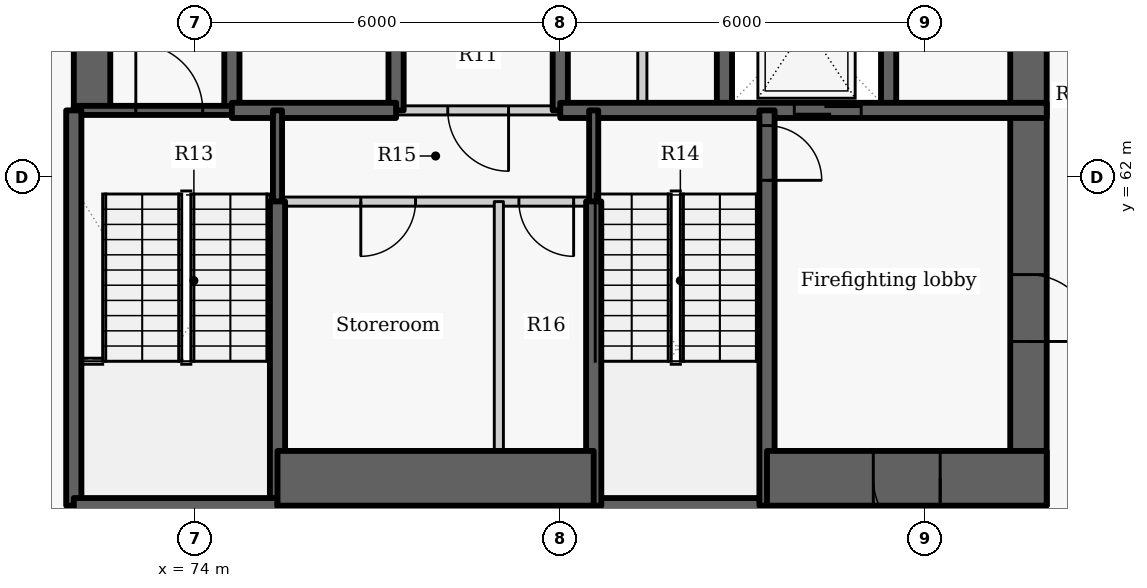
"""IFC4 building model, lengths in metres.
Left out: names, types, materials, properties, quantities, classifications, styles, units other than length and angle.
Written with IfcOpenShell. Run it as: python <this file> out.ifc"""

import sys

from ifc_helpers import new_model, si_unit, direction, frame, frame_2d, origin, place, context, subcontext, project, spatial, rectangle, extrude, element, fill, save


model = new_model("IFC4")
c1 = context("Model", 3, precision=1e-05, world=origin(), true_north=direction((0.0, 1.0)))
c2 = subcontext(c1, "Body", "Model", "MODEL_VIEW")
j1 = project(units=[si_unit("LENGTHUNIT", "METRE"), si_unit("PLANEANGLEUNIT", "RADIAN")], contexts=[c1])
p1 = place(None, origin())
s1 = spatial("IfcSite", under=j1, at=p1, CompositionType="ELEMENT")
p2 = place(p1, origin())
s2 = spatial("IfcBuilding", under=s1, at=p2, CompositionType="ELEMENT")
p3 = place(p2, frame((0.0, 0.0, 19.8)))
s3 = spatial("IfcBuildingStorey", under=s2, at=p3, CompositionType="ELEMENT", Elevation=19.8)
p4 = place(p3, frame((74.6, 63.1, -0.3), z_axis=(0.0, 0.0, 1.0), x_axis=(0.0, 1.0, 0.0)))
e1 = element("IfcWall", 1, at=p4, inside=s3, PredefinedType="SHEAR", context=c2, shape_type="SweptSolid", body=[
    extrude(rectangle(XDim=2.8, YDim=0.25, at=frame_2d((1.4, 0.0))), origin(), (0.0, 0.0, 1.0), 4.2),
])
p5 = place(p3, frame((72.3, 63.1, -0.3), z_axis=(0.0, 0.0, 1.0), x_axis=(0.0, 1.0, 0.0)))
e2 = element("IfcWall", 2, at=p5, inside=s3, PredefinedType="SHEAR", context=c2, shape_type="SweptSolid", body=[
    extrude(rectangle(XDim=9.1, YDim=0.6, at=frame_2d((4.55, 0.0))), origin(), (0.0, 0.0, 1.0), 4.2),
])
for number, where, z_axis, x_axis in (
    (3, (77.3, 63.1, -0.3), (0.0, 0.0, 1.0), (0.0, 1.0, 0.0)),
    (4, (80.0, 63.1, -0.3), (0.0, 0.0, 1.0), (0.0, 1.0, 0.0)),
    (5, (82.7, 63.1, -0.3), (0.0, 0.0, 1.0), (0.0, 1.0, 0.0)),
    (6, (85.4, 63.1, -0.3), (0.0, 0.0, 1.0), (0.0, 1.0, 0.0)),
):
    element("IfcWall", number, at=place(p3, frame(where, z_axis=z_axis, x_axis=x_axis)), inside=s3, PredefinedType="SHEAR", context=c2, shape_type="SweptSolid", body=[
        extrude(rectangle(XDim=2.8, YDim=0.25, at=frame_2d((1.4, 0.0))), origin(), (0.0, 0.0, 1.0), 4.2),
    ])
p6 = place(p3, frame((87.7, 72.2, -0.3), z_axis=(0.0, 0.0, 1.0), x_axis=(0.0, -1.0, 0.0)))
e7 = element("IfcWall", 7, at=p6, inside=s3, PredefinedType="SHEAR", context=c2, shape_type="SweptSolid", body=[
    extrude(rectangle(XDim=15.6, YDim=0.6, at=frame_2d((7.8, 0.0))), origin(), (0.0, 0.0, 1.0), 4.2),
])
p7 = place(p6, frame((11.8, 0.0, 0.3)))
e8 = element("IfcOpeningElement", 8, at=p7, cuts=e7, PredefinedType="OPENING", context=c2, shape_type="SweptSolid", body=[
    extrude(rectangle(XDim=1.1, YDim=2.1, at=frame_2d((0.55, 1.05))), frame((0.0, 0.31, 0.0), z_axis=(0.0, -1.0, 0.0), x_axis=(1.0, 0.0, 0.0)), (0.0, 0.0, 1.0), 0.62),
])
p8 = place(p3, frame((72.0, 63.1, -0.3), z_axis=(0.0, 0.0, 1.0), x_axis=(1.0, 0.0, 0.0)))
e9 = element("IfcWall", 9, at=p8, inside=s3, PredefinedType="SHEAR", context=c2, shape_type="SweptSolid", body=[
    extrude(rectangle(XDim=2.6, YDim=0.15, at=frame_2d((1.3, 0.0))), origin(), (0.0, 0.0, 1.0), 4.2),
])
p9 = place(p8, frame((1.02, 0.0, 0.3)))
e10 = element("IfcOpeningElement", 10, at=p9, cuts=e9, PredefinedType="OPENING", context=c2, shape_type="SweptSolid", body=[
    extrude(rectangle(XDim=1.1, YDim=2.1, at=frame_2d((0.55, 1.05))), frame((0.0, 0.085, 0.0), z_axis=(0.0, -1.0, 0.0), x_axis=(1.0, 0.0, 0.0)), (0.0, 0.0, 1.0), 0.17),
])
p10 = place(p3, frame((74.6, 63.1, -0.3), z_axis=(0.0, 0.0, 1.0), x_axis=(1.0, 0.0, 0.0)))
e11 = element("IfcWall", 11, at=p10, inside=s3, PredefinedType="SHEAR", context=c2, shape_type="SweptSolid", body=[
    extrude(rectangle(XDim=2.7, YDim=0.25, at=frame_2d((1.35, 0.0))), origin(), (0.0, 0.0, 1.0), 4.2),
])
p11 = place(p3, frame((80.0, 63.1, -0.3), z_axis=(0.0, 0.0, 1.0), x_axis=(1.0, 0.0, 0.0)))
e12 = element("IfcWall", 12, at=p11, inside=s3, PredefinedType="SHEAR", context=c2, shape_type="SweptSolid", body=[
    extrude(rectangle(XDim=8.0, YDim=0.25, at=frame_2d((4.0, 0.0))), origin(), (0.0, 0.0, 1.0), 4.2),
])
p12 = place(p11, frame((3.849, 0.0, 0.3)))
e13 = element("IfcOpeningElement", 13, at=p12, cuts=e12, PredefinedType="OPENING", context=c2, shape_type="SweptSolid", body=[
    extrude(rectangle(XDim=1.1, YDim=2.1, at=frame_2d((0.55, 1.05))), frame((0.0, 0.135, 0.0), z_axis=(0.0, -1.0, 0.0), x_axis=(1.0, 0.0, 0.0)), (0.0, 0.0, 1.0), 0.27),
])
p13 = place(p3, frame((80.0, 63.1, 0.0), z_axis=(0.0, 0.0, 1.0), x_axis=(-1.0, 0.0, 0.0)))
e14 = element("IfcWall", 14, at=p13, inside=s3, PredefinedType="PARTITIONING", context=c2, shape_type="SweptSolid", body=[
    extrude(rectangle(XDim=2.7, YDim=0.15, at=frame_2d((1.35, 0.0))), origin(), (0.0, 0.0, 1.0), 3.9),
])
p14 = place(p13, frame((0.85, 0.0, 0.0)))
e15 = element("IfcOpeningElement", 15, at=p14, cuts=e14, PredefinedType="OPENING", context=c2, shape_type="SweptSolid", body=[
    extrude(rectangle(XDim=1.0, YDim=2.1, at=frame_2d((0.5, 1.05))), frame((0.0, 0.085, 0.0), z_axis=(0.0, -1.0, 0.0), x_axis=(1.0, 0.0, 0.0)), (0.0, 0.0, 1.0), 0.17),
])
p15 = place(p3, frame((81.35, 63.1, 0.0), z_axis=(0.0, 0.0, 1.0), x_axis=(0.0, 1.0, 0.0)))
e16 = element("IfcWall", 16, at=p15, inside=s3, PredefinedType="PARTITIONING", context=c2, shape_type="SweptSolid", body=[
    extrude(rectangle(XDim=2.8, YDim=0.15, at=frame_2d((1.4, 0.0))), origin(), (0.0, 0.0, 1.0), 3.9),
])
p16 = place(p3, frame((75.35, 61.597, -0.3), z_axis=(0.0, 0.0, 1.0), x_axis=(0.0, 1.0, 0.0)))
e17 = element("IfcWall", 17, at=p16, inside=s3, PredefinedType="SHEAR", context=c2, shape_type="SweptSolid", body=[
    extrude(rectangle(XDim=1.503, YDim=0.15, at=frame_2d((0.751, 0.0))), origin(), (0.0, 0.0, 1.0), 4.2),
])
p17 = place(p3, frame((75.35, 56.6, -0.3), z_axis=(0.0, 0.0, 1.0), x_axis=(0.0, 1.0, 0.0)))
e18 = element("IfcWall", 18, at=p17, inside=s3, PredefinedType="SHEAR", context=c2, shape_type="SweptSolid", body=[
    extrude(rectangle(XDim=5.003, YDim=0.25, at=frame_2d((2.501, 0.0))), origin(), (0.0, 0.0, 1.0), 4.2),
])
p18 = place(p3, frame((72.0, 56.6, -0.3), z_axis=(0.0, 0.0, 1.0), x_axis=(0.0, 1.0, 0.0)))
e19 = element("IfcWall", 19, at=p18, inside=s3, PredefinedType="SHEAR", context=c2, shape_type="SweptSolid", body=[
    extrude(rectangle(XDim=6.5, YDim=0.25, at=frame_2d((3.25, 0.0))), origin(), (0.0, 0.0, 1.0), 4.2),
])
p19 = place(p3, frame((72.0, 56.6, -0.3), z_axis=(0.0, 0.0, 1.0), x_axis=(1.0, 0.0, 0.0)))
e20 = element("IfcWall", 20, at=p19, inside=s3, PredefinedType="SHEAR", context=c2, shape_type="SweptSolid", body=[
    extrude(rectangle(XDim=3.35, YDim=0.25, at=frame_2d((1.675, 0.0))), origin(), (0.0, 0.0, 1.0), 4.2),
])
p20 = place(p3, frame((80.55, 56.6, -0.3), z_axis=(0.0, 0.0, 1.0), x_axis=(1.0, 0.0, 0.0)))
e21 = element("IfcWall", 21, at=p20, inside=s3, PredefinedType="SHEAR", context=c2, shape_type="SweptSolid", body=[
    extrude(rectangle(XDim=2.85, YDim=0.25, at=frame_2d((1.425, 0.0))), origin(), (0.0, 0.0, 1.0), 4.2),
])
p21 = place(p3, frame((83.4, 63.1, -0.3), z_axis=(0.0, 0.0, 1.0), x_axis=(0.0, -1.0, 0.0)))
e22 = element("IfcWall", 22, at=p21, inside=s3, PredefinedType="SHEAR", context=c2, shape_type="SweptSolid", body=[
    extrude(rectangle(XDim=6.5, YDim=0.25, at=frame_2d((3.25, 0.0))), origin(), (0.0, 0.0, 1.0), 4.2),
])
p22 = place(p21, frame((0.25, 0.0, 0.3)))
e23 = element("IfcOpeningElement", 23, at=p22, cuts=e22, PredefinedType="OPENING", context=c2, shape_type="SweptSolid", body=[
    extrude(rectangle(XDim=0.9, YDim=2.1, at=frame_2d((0.45, 1.05))), frame((0.0, 0.135, 0.0), z_axis=(0.0, -1.0, 0.0), x_axis=(1.0, 0.0, 0.0)), (0.0, 0.0, 1.0), 0.27),
])
p23 = place(p3, frame((80.55, 61.597, -0.3), z_axis=(0.0, 0.0, 1.0), x_axis=(0.0, 1.0, 0.0)))
e24 = element("IfcWall", 24, at=p23, inside=s3, PredefinedType="SHEAR", context=c2, shape_type="SweptSolid", body=[
    extrude(rectangle(XDim=1.503, YDim=0.15, at=frame_2d((0.751, 0.0))), origin(), (0.0, 0.0, 1.0), 4.2),
])
p24 = place(p3, frame((80.55, 56.6, -0.3), z_axis=(0.0, 0.0, 1.0), x_axis=(0.0, 1.0, 0.0)))
e25 = element("IfcWall", 25, at=p24, inside=s3, PredefinedType="SHEAR", context=c2, shape_type="SweptSolid", body=[
    extrude(rectangle(XDim=5.003, YDim=0.25, at=frame_2d((2.501, 0.0))), origin(), (0.0, 0.0, 1.0), 4.2),
])
p25 = place(p3, frame((75.35, 57.05, -0.3), z_axis=(0.0, 0.0, 1.0), x_axis=(1.0, 0.0, 0.0)))
e26 = element("IfcWall", 26, at=p25, inside=s3, PredefinedType="SHEAR", context=c2, shape_type="SweptSolid", body=[
    extrude(rectangle(XDim=5.2, YDim=0.9, at=frame_2d((2.6, 0.0))), origin(), (0.0, 0.0, 1.0), 4.2),
])
p26 = place(p3, frame((88.0, 57.05, -0.3), z_axis=(0.0, 0.0, 1.0), x_axis=(-1.0, 0.0, 0.0)))
e27 = element("IfcWall", 27, at=p26, inside=s3, PredefinedType="SHEAR", context=c2, shape_type="SweptSolid", body=[
    extrude(rectangle(XDim=4.6, YDim=0.9, at=frame_2d((2.3, 0.0))), origin(), (0.0, 0.0, 1.0), 4.2),
])
p27 = place(p26, frame((1.752, 0.0, 0.3)))
e28 = element("IfcOpeningElement", 28, at=p27, cuts=e27, PredefinedType="OPENING", context=c2, shape_type="SweptSolid", body=[
    extrude(rectangle(XDim=1.1, YDim=2.1, at=frame_2d((0.55, 1.05))), frame((0.0, 0.46, 0.0), z_axis=(0.0, -1.0, 0.0), x_axis=(1.0, 0.0, 0.0)), (0.0, 0.0, 1.0), 0.92),
])
p28 = place(p3, frame((80.55, 61.6, 0.0), z_axis=(0.0, 0.0, 1.0), x_axis=(-1.0, 0.0, 0.0)))
e29 = element("IfcWall", 29, at=p28, inside=s3, PredefinedType="PARTITIONING", context=c2, shape_type="SweptSolid", body=[
    extrude(rectangle(XDim=5.2, YDim=0.15, at=frame_2d((2.6, 0.0))), origin(), (0.0, 0.0, 1.0), 3.9),
])
p29 = place(p28, frame((2.93, 0.0, 0.0)))
e30 = element("IfcOpeningElement", 30, at=p29, cuts=e29, PredefinedType="OPENING", context=c2, shape_type="SweptSolid", body=[
    extrude(rectangle(XDim=0.9, YDim=2.1, at=frame_2d((0.45, 1.05))), frame((0.0, 0.085, 0.0), z_axis=(0.0, -1.0, 0.0), x_axis=(1.0, 0.0, 0.0)), (0.0, 0.0, 1.0), 0.17),
])
p30 = place(p28, frame((0.33, 0.0, 0.0)))
e31 = element("IfcOpeningElement", 31, at=p30, cuts=e29, PredefinedType="OPENING", context=c2, shape_type="SweptSolid", body=[
    extrude(rectangle(XDim=0.9, YDim=2.1, at=frame_2d((0.45, 1.05))), frame((0.0, 0.085, 0.0), z_axis=(0.0, -1.0, 0.0), x_axis=(1.0, 0.0, 0.0)), (0.0, 0.0, 1.0), 0.17),
])
p31 = place(p3, frame((78.99, 56.6, 0.0), z_axis=(0.0, 0.0, 1.0), x_axis=(0.0, 1.0, 0.0)))
e32 = element("IfcWall", 32, at=p31, inside=s3, PredefinedType="PARTITIONING", context=c2, shape_type="SweptSolid", body=[
    extrude(rectangle(XDim=5.0, YDim=0.15, at=frame_2d((2.5, 0.0))), origin(), (0.0, 0.0, 1.0), 3.9),
])
p32 = place(p12, origin())
e33 = element("IfcDoor", 33, at=p32, inside=s3, OperationType="SLIDING_TO_LEFT", PredefinedType="DOOR", context=c2, shape_type="SweptSolid", body=[
    extrude(rectangle(XDim=1.1, YDim=2.1, at=frame_2d((0.55, 1.05))), frame((0.0, 0.025, 0.0), z_axis=(0.0, -1.0, 0.0), x_axis=(1.0, 0.0, 0.0)), (0.0, 0.0, 1.0), 0.05),
])
fill(e13, e33)
p33 = place(p14, origin())
e34 = element("IfcDoor", 34, at=p33, inside=s3, OperationType="SINGLE_SWING_LEFT", PredefinedType="DOOR", context=c2, shape_type="SweptSolid", body=[
    extrude(rectangle(XDim=1.0, YDim=2.1, at=frame_2d((0.5, 1.05))), frame((0.0, 0.025, 0.0), z_axis=(0.0, -1.0, 0.0), x_axis=(1.0, 0.0, 0.0)), (0.0, 0.0, 1.0), 0.05),
])
fill(e15, e34)
p34 = place(p29, origin())
e35 = element("IfcDoor", 35, at=p34, inside=s3, OperationType="SINGLE_SWING_RIGHT", PredefinedType="DOOR", context=c2, shape_type="SweptSolid", body=[
    extrude(rectangle(XDim=0.9, YDim=2.1, at=frame_2d((0.45, 1.05))), frame((0.0, 0.025, 0.0), z_axis=(0.0, -1.0, 0.0), x_axis=(1.0, 0.0, 0.0)), (0.0, 0.0, 1.0), 0.05),
])
fill(e30, e35)
p35 = place(p30, origin())
e36 = element("IfcDoor", 36, at=p35, inside=s3, OperationType="SINGLE_SWING_LEFT", PredefinedType="DOOR", context=c2, shape_type="SweptSolid", body=[
    extrude(rectangle(XDim=0.9, YDim=2.1, at=frame_2d((0.45, 1.05))), frame((0.0, 0.025, 0.0), z_axis=(0.0, -1.0, 0.0), x_axis=(1.0, 0.0, 0.0)), (0.0, 0.0, 1.0), 0.05),
])
fill(e31, e36)
p36 = place(p9, origin())
e37 = element("IfcDoor", 37, at=p36, inside=s3, OperationType="SINGLE_SWING_LEFT", PredefinedType="DOOR", context=c2, shape_type="SweptSolid", body=[
    extrude(rectangle(XDim=1.1, YDim=2.1, at=frame_2d((0.55, 1.05))), frame((0.0, 0.025, 0.0), z_axis=(0.0, -1.0, 0.0), x_axis=(1.0, 0.0, 0.0)), (0.0, 0.0, 1.0), 0.05),
])
fill(e10, e37)
p37 = place(p22, origin())
e38 = element("IfcDoor", 38, at=p37, inside=s3, OperationType="SINGLE_SWING_RIGHT", PredefinedType="DOOR", context=c2, shape_type="SweptSolid", body=[
    extrude(rectangle(XDim=0.9, YDim=2.1, at=frame_2d((0.45, 1.05))), frame((0.0, 0.025, 0.0), z_axis=(0.0, -1.0, 0.0), x_axis=(1.0, 0.0, 0.0)), (0.0, 0.0, 1.0), 0.05),
])
fill(e23, e38)
p38 = place(p7, origin())
e39 = element("IfcDoor", 39, at=p38, inside=s3, OperationType="SINGLE_SWING_RIGHT", PredefinedType="DOOR", context=c2, shape_type="SweptSolid", body=[
    extrude(rectangle(XDim=1.1, YDim=2.1, at=frame_2d((0.55, 1.05))), frame((0.0, 0.025, 0.0), z_axis=(0.0, -1.0, 0.0), x_axis=(1.0, 0.0, 0.0)), (0.0, 0.0, 1.0), 0.05),
])
fill(e8, e39)
p39 = place(p27, origin())
e40 = element("IfcDoor", 40, at=p39, inside=s3, OperationType="SINGLE_SWING_LEFT", PredefinedType="DOOR", context=c2, shape_type="SweptSolid", body=[
    extrude(rectangle(XDim=1.1, YDim=2.1, at=frame_2d((0.55, 1.05))), frame((0.0, 0.025, 0.0), z_axis=(0.0, -1.0, 0.0), x_axis=(1.0, 0.0, 0.0)), (0.0, 0.0, 1.0), 0.05),
])
fill(e28, e40)
save(model, sys.argv[1])
